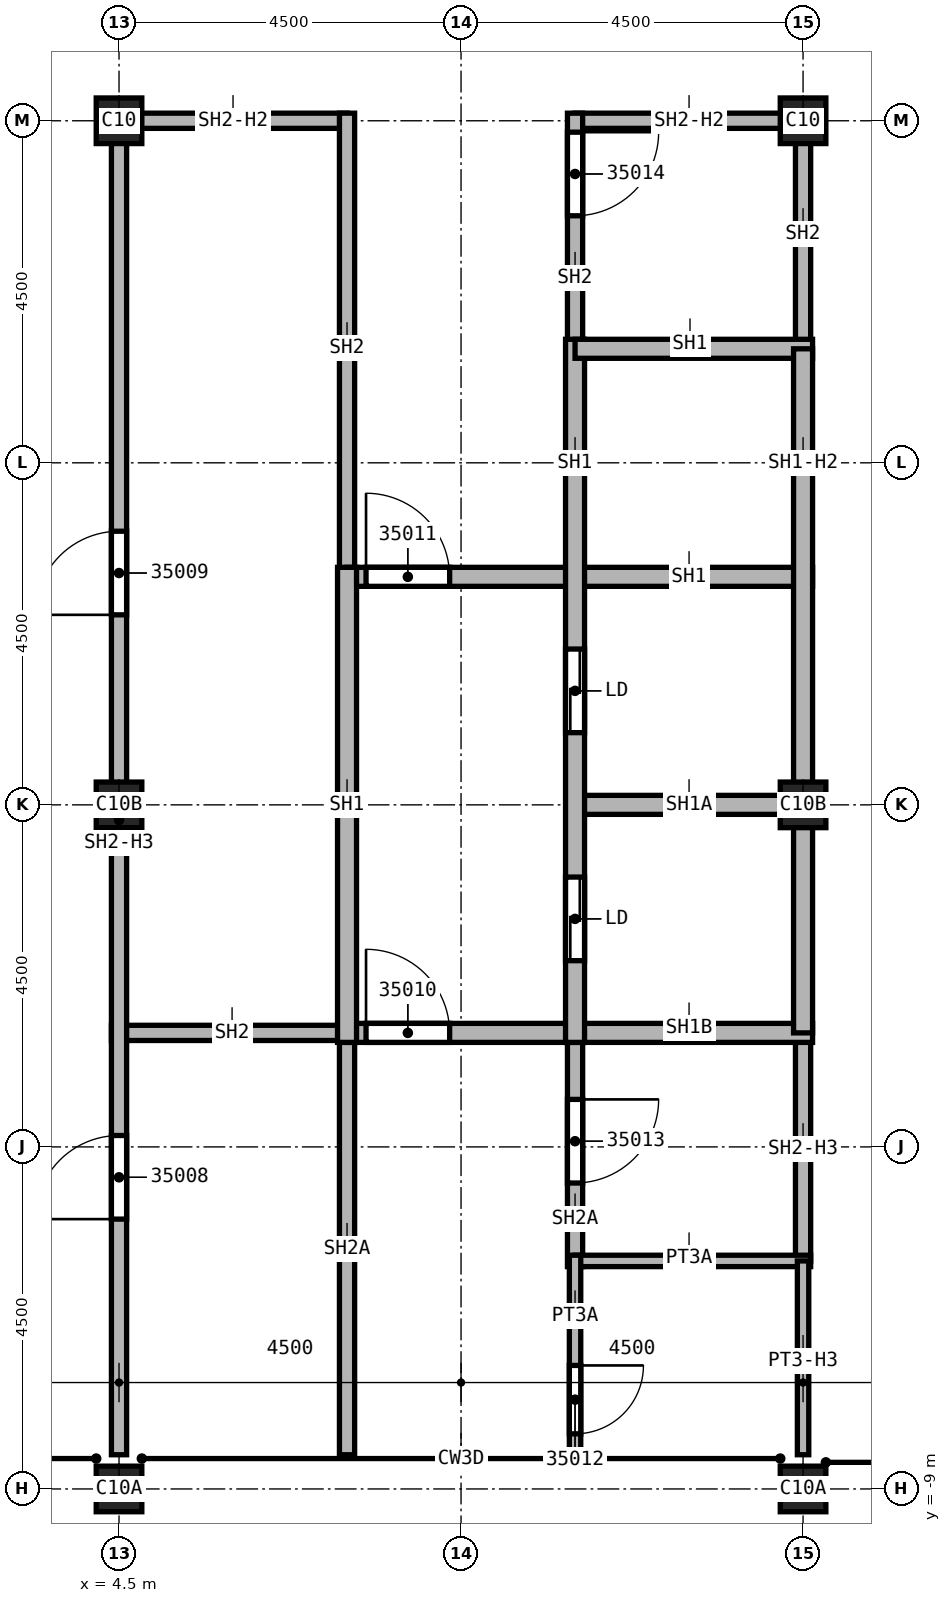
"""IFC4 building model, lengths in metres.
Left out: names, types, materials, properties, quantities, classifications, styles, units other than length and angle.
Written with IfcOpenShell. Run it as: python <this file> out.ifc"""

import sys

from ifc_helpers import new_model, si_unit, direction, frame, frame_2d, origin, origin_2d, place, context, subcontext, project, spatial, rectangle, extrude, element, fill, save


model = new_model("IFC4")
c1 = context("Model", 3, precision=1e-05, world=origin(), true_north=direction((0.0, 1.0)))
c2 = subcontext(c1, "Body", "Model", "MODEL_VIEW")
j1 = project(units=[si_unit("LENGTHUNIT", "METRE"), si_unit("PLANEANGLEUNIT", "RADIAN")], contexts=[c1])
p1 = place(None, origin())
s1 = spatial("IfcSite", under=j1, at=p1, CompositionType="ELEMENT")
p2 = place(p1, origin())
s2 = spatial("IfcBuilding", under=s1, at=p2, CompositionType="ELEMENT")
p3 = place(p2, frame((0.0, 0.0, 376.0)))
s3 = spatial("IfcBuildingStorey", under=s2, at=p3, CompositionType="ELEMENT", Elevation=376.0)
p4 = place(p3, frame((4.5, 0.0, 0.0), z_axis=(0.0, 0.0, 1.0), x_axis=(1.0, 0.0, 0.0)))
e1 = element("IfcColumn", 1, at=p4, inside=s3, PredefinedType="COLUMN", context=c2, shape_type="SweptSolid", body=[
    extrude(rectangle(XDim=0.6, YDim=0.6, at=origin_2d()), origin(), (0.0, 0.0, 1.0), 7.919),
])
p5 = place(p3, frame((4.5, 9.0, 0.0), z_axis=(0.0, 0.0, 1.0), x_axis=(1.0, 0.0, 0.0)))
e2 = element("IfcColumn", 2, at=p5, inside=s3, PredefinedType="COLUMN", context=c2, shape_type="SweptSolid", body=[
    extrude(rectangle(XDim=0.6, YDim=0.6, at=origin_2d()), origin(), (0.0, 0.0, 1.0), 4.6),
])
p6 = place(p3, frame((4.5, -9.0, 0.0), z_axis=(0.0, 0.0, 1.0), x_axis=(1.0, 0.0, 0.0)))
e3 = element("IfcColumn", 3, at=p6, inside=s3, PredefinedType="COLUMN", context=c2, shape_type="SweptSolid", body=[
    extrude(rectangle(XDim=0.6, YDim=0.6, at=origin_2d()), origin(), (0.0, 0.0, 1.0), 3.725),
])
p7 = place(p3, frame((13.5, 0.0, 0.0), z_axis=(0.0, 0.0, 1.0), x_axis=(1.0, 0.0, 0.0)))
e4 = element("IfcColumn", 4, at=p7, inside=s3, PredefinedType="COLUMN", context=c2, shape_type="SweptSolid", body=[
    extrude(rectangle(XDim=0.6, YDim=0.6, at=origin_2d()), origin(), (0.0, 0.0, 1.0), 7.919),
])
p8 = place(p3, frame((13.5, 9.0, 0.0), z_axis=(0.0, 0.0, 1.0), x_axis=(1.0, 0.0, 0.0)))
e5 = element("IfcColumn", 5, at=p8, inside=s3, PredefinedType="COLUMN", context=c2, shape_type="SweptSolid", body=[
    extrude(rectangle(XDim=0.6, YDim=0.6, at=origin_2d()), origin(), (0.0, 0.0, 1.0), 4.6),
])
p9 = place(p3, frame((13.5, -9.0, 0.0), z_axis=(0.0, 0.0, 1.0), x_axis=(1.0, 0.0, 0.0)))
e6 = element("IfcColumn", 6, at=p9, inside=s3, PredefinedType="COLUMN", context=c2, shape_type="SweptSolid", body=[
    extrude(rectangle(XDim=0.6, YDim=0.6, at=origin_2d()), origin(), (0.0, 0.0, 1.0), 3.725),
])
p10 = place(p3, frame((4.4, -3.0, 0.0), z_axis=(0.0, 0.0, 1.0), x_axis=(1.0, 0.0, 0.0)))
e7 = element("IfcWall", 7, at=p10, inside=s3, PredefinedType="SOLIDWALL", context=c2, shape_type="SweptSolid", body=[
    extrude(rectangle(XDim=3.225, YDim=0.2, at=frame_2d((1.613, 0.0))), origin(), (0.0, 0.0, 1.0), 4.15),
])
p11 = place(p3, frame((4.5, -8.55, 0.0), z_axis=(0.0, 0.0, 1.0), x_axis=(0.0, 1.0, 0.0)))
e8 = element("IfcWall", 8, at=p11, inside=s3, PredefinedType="SOLIDWALL", context=c2, shape_type="SweptSolid", body=[
    extrude(rectangle(XDim=17.65, YDim=0.2, at=frame_2d((8.825, 0.0))), origin(), (0.0, 0.0, 1.0), 3.722),
])
p12 = place(p11, frame((3.1, 0.0, 0.0)))
e9 = element("IfcOpeningElement", 9, at=p12, cuts=e8, PredefinedType="OPENING", context=c2, shape_type="SweptSolid", body=[
    extrude(rectangle(XDim=1.1, YDim=2.1, at=frame_2d((0.55, 1.05))), frame((0.0, 0.1, 0.0), z_axis=(0.0, -1.0, 0.0), x_axis=(1.0, 0.0, 0.0)), (0.0, 0.0, 1.0), 0.2),
])
p13 = place(p11, frame((11.05, 0.0, 0.0)))
e10 = element("IfcOpeningElement", 10, at=p13, cuts=e8, PredefinedType="OPENING", context=c2, shape_type="SweptSolid", body=[
    extrude(rectangle(XDim=1.1, YDim=2.1, at=frame_2d((0.55, 1.05))), frame((0.0, 0.1, 0.0), z_axis=(0.0, -1.0, 0.0), x_axis=(1.0, 0.0, 0.0)), (0.0, 0.0, 1.0), 0.2),
])
p14 = place(p3, frame((4.5, 9.0, 0.0), z_axis=(0.0, 0.0, 1.0), x_axis=(1.0, 0.0, 0.0)))
e11 = element("IfcWall", 11, at=p14, inside=s3, PredefinedType="SOLIDWALL", context=c2, shape_type="SweptSolid", body=[
    extrude(rectangle(XDim=3.0, YDim=0.2, at=frame_2d((1.5, 0.0))), origin(), (0.0, 0.0, 1.0), 3.754),
])
p15 = place(p3, frame((7.5, -2.875, 0.0), z_axis=(0.0, 0.0, 1.0), x_axis=(0.0, -1.0, 0.0)))
e12 = element("IfcWall", 12, at=p15, inside=s3, PredefinedType="SOLIDWALL", context=c2, shape_type="SweptSolid", body=[
    extrude(rectangle(XDim=5.675, YDim=0.2, at=frame_2d((2.837, 0.0))), origin(), (0.0, 0.0, 1.0), 4.566),
])
p16 = place(p3, frame((7.5, 9.1, 0.0), z_axis=(0.0, 0.0, 1.0), x_axis=(0.0, -1.0, 0.0)))
e13 = element("IfcWall", 13, at=p16, inside=s3, PredefinedType="SOLIDWALL", context=c2, shape_type="SweptSolid", body=[
    extrude(rectangle(XDim=6.225, YDim=0.2, at=frame_2d((3.113, 0.0))), origin(), (0.0, 0.0, 1.0), 4.15),
])
p17 = place(p3, frame((10.5, -2.875, 0.0), z_axis=(0.0, 0.0, 1.0), x_axis=(0.0, -1.0, 0.0)))
e14 = element("IfcWall", 14, at=p17, inside=s3, PredefinedType="SOLIDWALL", context=c2, shape_type="SweptSolid", body=[
    extrude(rectangle(XDim=3.2, YDim=0.2, at=frame_2d((1.6, 0.0))), origin(), (0.0, 0.0, 1.0), 4.566),
])
p18 = place(p17, frame((1.0, 0.0, 0.0)))
e15 = element("IfcOpeningElement", 15, at=p18, cuts=e14, PredefinedType="OPENING", context=c2, shape_type="SweptSolid", body=[
    extrude(rectangle(XDim=1.1, YDim=2.1, at=frame_2d((0.55, 1.05))), frame((0.0, 0.1, 0.0), z_axis=(0.0, -1.0, 0.0), x_axis=(1.0, 0.0, 0.0)), (0.0, 0.0, 1.0), 0.2),
])
p19 = place(p3, frame((10.5, 9.0, 0.0), z_axis=(0.0, 0.0, 1.0), x_axis=(1.0, 0.0, 0.0)))
e16 = element("IfcWall", 16, at=p19, inside=s3, PredefinedType="SOLIDWALL", context=c2, shape_type="SweptSolid", body=[
    extrude(rectangle(XDim=3.0, YDim=0.2, at=frame_2d((1.5, 0.0))), origin(), (0.0, 0.0, 1.0), 3.754),
])
p20 = place(p3, frame((10.5, 9.1, 0.0), z_axis=(0.0, 0.0, 1.0), x_axis=(0.0, -1.0, 0.0)))
e17 = element("IfcWall", 17, at=p20, inside=s3, PredefinedType="SOLIDWALL", context=c2, shape_type="SweptSolid", body=[
    extrude(rectangle(XDim=3.225, YDim=0.2, at=frame_2d((1.613, 0.0))), origin(), (0.0, 0.0, 1.0), 4.15),
])
p21 = place(p20, frame((0.25, 0.0, 0.0)))
e18 = element("IfcOpeningElement", 18, at=p21, cuts=e17, PredefinedType="OPENING", context=c2, shape_type="SweptSolid", body=[
    extrude(rectangle(XDim=1.1, YDim=2.1, at=frame_2d((0.55, 1.05))), frame((0.0, 0.1, 0.0), z_axis=(0.0, -1.0, 0.0), x_axis=(1.0, 0.0, 0.0)), (0.0, 0.0, 1.0), 0.2),
])
p22 = place(p3, frame((13.5, -3.0, 0.0), z_axis=(0.0, 0.0, 1.0), x_axis=(0.0, -1.0, 0.0)))
e19 = element("IfcWall", 19, at=p22, inside=s3, PredefinedType="SOLIDWALL", context=c2, shape_type="SweptSolid", body=[
    extrude(rectangle(XDim=3.0, YDim=0.2, at=frame_2d((1.5, 0.0))), origin(), (0.0, 0.0, 1.0), 3.722),
])
p23 = place(p3, frame((13.5, 9.1, 0.0), z_axis=(0.0, 0.0, 1.0), x_axis=(0.0, -1.0, 0.0)))
e20 = element("IfcWall", 20, at=p23, inside=s3, PredefinedType="SOLIDWALL", context=c2, shape_type="SweptSolid", body=[
    extrude(rectangle(XDim=3.1, YDim=0.2, at=frame_2d((1.55, 0.0))), origin(), (0.0, 0.0, 1.0), 4.15),
])
p24 = place(p3, frame((7.5, -3.0, 0.0), z_axis=(0.0, 0.0, 1.0), x_axis=(1.0, 0.0, 0.0)))
e21 = element("IfcWall", 21, at=p24, inside=s3, PredefinedType="SOLIDWALL", context=c2, shape_type="SweptSolid", body=[
    extrude(rectangle(XDim=6.125, YDim=0.25, at=frame_2d((3.062, 0.0))), origin(), (0.0, 0.0, 1.0), 4.566),
])
p25 = place(p24, frame((0.25, 0.0, 0.0)))
e22 = element("IfcOpeningElement", 22, at=p25, cuts=e21, PredefinedType="OPENING", context=c2, shape_type="SweptSolid", body=[
    extrude(rectangle(XDim=1.1, YDim=2.1, at=frame_2d((0.55, 1.05))), frame((0.0, 0.125, 0.0), z_axis=(0.0, -1.0, 0.0), x_axis=(1.0, 0.0, 0.0)), (0.0, 0.0, 1.0), 0.25),
])
p26 = place(p3, frame((7.5, 3.0, 0.0), z_axis=(0.0, 0.0, 1.0), x_axis=(1.0, 0.0, 0.0)))
e23 = element("IfcWall", 23, at=p26, inside=s3, PredefinedType="SOLIDWALL", context=c2, shape_type="SweptSolid", body=[
    extrude(rectangle(XDim=6.125, YDim=0.25, at=frame_2d((3.062, 0.0))), origin(), (0.0, 0.0, 1.0), 4.15),
])
p27 = place(p26, frame((0.25, 0.0, 0.0)))
e24 = element("IfcOpeningElement", 24, at=p27, cuts=e23, PredefinedType="OPENING", context=c2, shape_type="SweptSolid", body=[
    extrude(rectangle(XDim=1.1, YDim=2.1, at=frame_2d((0.55, 1.05))), frame((0.0, 0.125, 0.0), z_axis=(0.0, -1.0, 0.0), x_axis=(1.0, 0.0, 0.0)), (0.0, 0.0, 1.0), 0.25),
])
p28 = place(p3, frame((7.5, 3.125, 0.0), z_axis=(0.0, 0.0, 1.0), x_axis=(0.0, -1.0, 0.0)))
e25 = element("IfcWall", 25, at=p28, inside=s3, PredefinedType="SOLIDWALL", context=c2, shape_type="SweptSolid", body=[
    extrude(rectangle(XDim=6.25, YDim=0.25, at=frame_2d((3.125, 0.0))), origin(), (0.0, 0.0, 1.0), 4.15),
])
p29 = place(p3, frame((10.5, 0.0, 0.0), z_axis=(0.0, 0.0, 1.0), x_axis=(1.0, 0.0, 0.0)))
e26 = element("IfcWall", 26, at=p29, inside=s3, PredefinedType="SOLIDWALL", context=c2, shape_type="SweptSolid", body=[
    extrude(rectangle(XDim=3.125, YDim=0.25, at=frame_2d((1.562, 0.0))), origin(), (0.0, 0.0, 1.0), 7.152),
])
p30 = place(p3, frame((10.5, 6.125, 0.0), z_axis=(0.0, 0.0, 1.0), x_axis=(0.0, -1.0, 0.0)))
e27 = element("IfcWall", 27, at=p30, inside=s3, PredefinedType="SOLIDWALL", context=c2, shape_type="SweptSolid", body=[
    extrude(rectangle(XDim=9.25, YDim=0.25, at=frame_2d((4.625, 0.0))), origin(), (0.0, 0.0, 1.0), 4.15),
])
p31 = place(p30, frame((7.075, 0.0, 0.0)))
e28 = element("IfcOpeningElement", 28, at=p31, cuts=e27, PredefinedType="OPENING", context=c2, shape_type="SweptSolid", body=[
    extrude(rectangle(XDim=1.1, YDim=2.1, at=frame_2d((0.55, 1.05))), frame((0.0, 0.125, 0.0), z_axis=(0.0, -1.0, 0.0), x_axis=(1.0, 0.0, 0.0)), (0.0, 0.0, 1.0), 0.25),
])
p32 = place(p30, frame((4.075, 0.0, 0.0)))
e29 = element("IfcOpeningElement", 29, at=p32, cuts=e27, PredefinedType="OPENING", context=c2, shape_type="SweptSolid", body=[
    extrude(rectangle(XDim=1.1, YDim=2.1, at=frame_2d((0.55, 1.05))), frame((0.0, 0.125, 0.0), z_axis=(0.0, -1.0, 0.0), x_axis=(1.0, 0.0, 0.0)), (0.0, 0.0, 1.0), 0.25),
])
p33 = place(p3, frame((10.5, 6.0, 0.0), z_axis=(0.0, 0.0, 1.0), x_axis=(1.0, 0.0, 0.0)))
e30 = element("IfcWall", 30, at=p33, inside=s3, PredefinedType="SOLIDWALL", context=c2, shape_type="SweptSolid", body=[
    extrude(rectangle(XDim=3.125, YDim=0.25, at=frame_2d((1.562, 0.0))), origin(), (0.0, 0.0, 1.0), 4.15),
])
p34 = place(p3, frame((13.5, 6.0, 0.0), z_axis=(0.0, 0.0, 1.0), x_axis=(0.0, -1.0, 0.0)))
e31 = element("IfcWall", 31, at=p34, inside=s3, PredefinedType="SOLIDWALL", context=c2, shape_type="SweptSolid", body=[
    extrude(rectangle(XDim=9.0, YDim=0.25, at=frame_2d((4.5, 0.0))), origin(), (0.0, 0.0, 1.0), 3.722),
])
p35 = place(p3, frame((10.5, -6.0, 0.0), z_axis=(0.0, 0.0, 1.0), x_axis=(1.0, 0.0, 0.0)))
e32 = element("IfcWall", 32, at=p35, inside=s3, PredefinedType="PARTITIONING", context=c2, shape_type="SweptSolid", body=[
    extrude(rectangle(XDim=3.1, YDim=0.15, at=frame_2d((1.55, 0.0))), origin(), (0.0, 0.0, 1.0), 4.566),
])
p36 = place(p3, frame((10.5, -5.925, 0.0), z_axis=(0.0, 0.0, 1.0), x_axis=(0.0, -1.0, 0.0)))
e33 = element("IfcWall", 33, at=p36, inside=s3, PredefinedType="PARTITIONING", context=c2, shape_type="SweptSolid", body=[
    extrude(rectangle(XDim=2.625, YDim=0.15, at=frame_2d((1.312, 0.0))), origin(), (0.0, 0.0, 1.0), 4.566),
])
p37 = place(p36, frame((1.45, 0.0, 0.0)))
e34 = element("IfcOpeningElement", 34, at=p37, cuts=e33, PredefinedType="OPENING", context=c2, shape_type="SweptSolid", body=[
    extrude(rectangle(XDim=0.9, YDim=2.1, at=frame_2d((0.45, 1.05))), frame((0.0, 0.075, 0.0), z_axis=(0.0, -1.0, 0.0), x_axis=(1.0, 0.0, 0.0)), (0.0, 0.0, 1.0), 0.15),
])
p38 = place(p3, frame((13.5, -6.0, 0.0), z_axis=(0.0, 0.0, 1.0), x_axis=(0.0, -1.0, 0.0)))
e35 = element("IfcWall", 35, at=p38, inside=s3, PredefinedType="PARTITIONING", context=c2, shape_type="SweptSolid", body=[
    extrude(rectangle(XDim=2.55, YDim=0.15, at=frame_2d((1.275, 0.0))), origin(), (0.0, 0.0, 1.0), 3.722),
])
p39 = place(p12, origin())
e36 = element("IfcDoor", 36, at=p39, inside=s3, OperationType="SINGLE_SWING_LEFT", PredefinedType="DOOR", context=c2, shape_type="SweptSolid", body=[
    extrude(rectangle(XDim=1.1, YDim=2.1, at=frame_2d((0.55, 1.05))), frame((0.0, 0.025, 0.0), z_axis=(0.0, -1.0, 0.0), x_axis=(1.0, 0.0, 0.0)), (0.0, 0.0, 1.0), 0.05),
])
fill(e9, e36)
p40 = place(p13, origin())
e37 = element("IfcDoor", 37, at=p40, inside=s3, OperationType="SINGLE_SWING_RIGHT", PredefinedType="DOOR", context=c2, shape_type="SweptSolid", body=[
    extrude(rectangle(XDim=1.1, YDim=2.1, at=frame_2d((0.55, 1.05))), frame((0.0, 0.025, 0.0), z_axis=(0.0, -1.0, 0.0), x_axis=(1.0, 0.0, 0.0)), (0.0, 0.0, 1.0), 0.05),
])
fill(e10, e37)
p41 = place(p25, origin())
e38 = element("IfcDoor", 38, at=p41, inside=s3, OperationType="SINGLE_SWING_LEFT", PredefinedType="DOOR", context=c2, shape_type="SweptSolid", body=[
    extrude(rectangle(XDim=1.1, YDim=2.1, at=frame_2d((0.55, 1.05))), frame((0.0, 0.025, 0.0), z_axis=(0.0, -1.0, 0.0), x_axis=(1.0, 0.0, 0.0)), (0.0, 0.0, 1.0), 0.05),
])
fill(e22, e38)
p42 = place(p27, origin())
e39 = element("IfcDoor", 39, at=p42, inside=s3, OperationType="SINGLE_SWING_RIGHT", PredefinedType="DOOR", context=c2, shape_type="SweptSolid", body=[
    extrude(rectangle(XDim=1.1, YDim=2.1, at=frame_2d((0.55, 1.05))), frame((0.0, 0.025, 0.0), z_axis=(0.0, -1.0, 0.0), x_axis=(1.0, 0.0, 0.0)), (0.0, 0.0, 1.0), 0.05),
])
fill(e24, e39)
p43 = place(p37, origin())
e40 = element("IfcDoor", 40, at=p43, inside=s3, OperationType="SINGLE_SWING_LEFT", PredefinedType="DOOR", context=c2, shape_type="SweptSolid", body=[
    extrude(rectangle(XDim=0.9, YDim=2.1, at=frame_2d((0.45, 1.05))), frame((0.0, 0.025, 0.0), z_axis=(0.0, -1.0, 0.0), x_axis=(1.0, 0.0, 0.0)), (0.0, 0.0, 1.0), 0.05),
])
fill(e34, e40)
p44 = place(p18, origin())
e41 = element("IfcDoor", 41, at=p44, inside=s3, OperationType="SINGLE_SWING_RIGHT", PredefinedType="DOOR", context=c2, shape_type="SweptSolid", body=[
    extrude(rectangle(XDim=1.1, YDim=2.1, at=frame_2d((0.55, 1.05))), frame((0.0, 0.025, 0.0), z_axis=(0.0, -1.0, 0.0), x_axis=(1.0, 0.0, 0.0)), (0.0, 0.0, 1.0), 0.05),
])
fill(e15, e41)
p45 = place(p21, origin())
e42 = element("IfcDoor", 42, at=p45, inside=s3, OperationType="SINGLE_SWING_LEFT", PredefinedType="DOOR", context=c2, shape_type="SweptSolid", body=[
    extrude(rectangle(XDim=1.1, YDim=2.1, at=frame_2d((0.55, 1.05))), frame((0.0, 0.025, 0.0), z_axis=(0.0, -1.0, 0.0), x_axis=(1.0, 0.0, 0.0)), (0.0, 0.0, 1.0), 0.05),
])
fill(e18, e42)
p46 = place(p31, origin())
e43 = element("IfcDoor", 43, at=p46, inside=s3, OperationType="SLIDING_TO_LEFT", PredefinedType="DOOR", context=c2, shape_type="SweptSolid", body=[
    extrude(rectangle(XDim=1.1, YDim=2.1, at=frame_2d((0.55, 1.05))), frame((0.0, 0.025, 0.0), z_axis=(0.0, -1.0, 0.0), x_axis=(1.0, 0.0, 0.0)), (0.0, 0.0, 1.0), 0.05),
])
fill(e28, e43)
p47 = place(p32, origin())
e44 = element("IfcDoor", 44, at=p47, inside=s3, OperationType="SLIDING_TO_LEFT", PredefinedType="DOOR", context=c2, shape_type="SweptSolid", body=[
    extrude(rectangle(XDim=1.1, YDim=2.1, at=frame_2d((0.55, 1.05))), frame((0.0, 0.025, 0.0), z_axis=(0.0, -1.0, 0.0), x_axis=(1.0, 0.0, 0.0)), (0.0, 0.0, 1.0), 0.05),
])
fill(e29, e44)
save(model, sys.argv[1])
